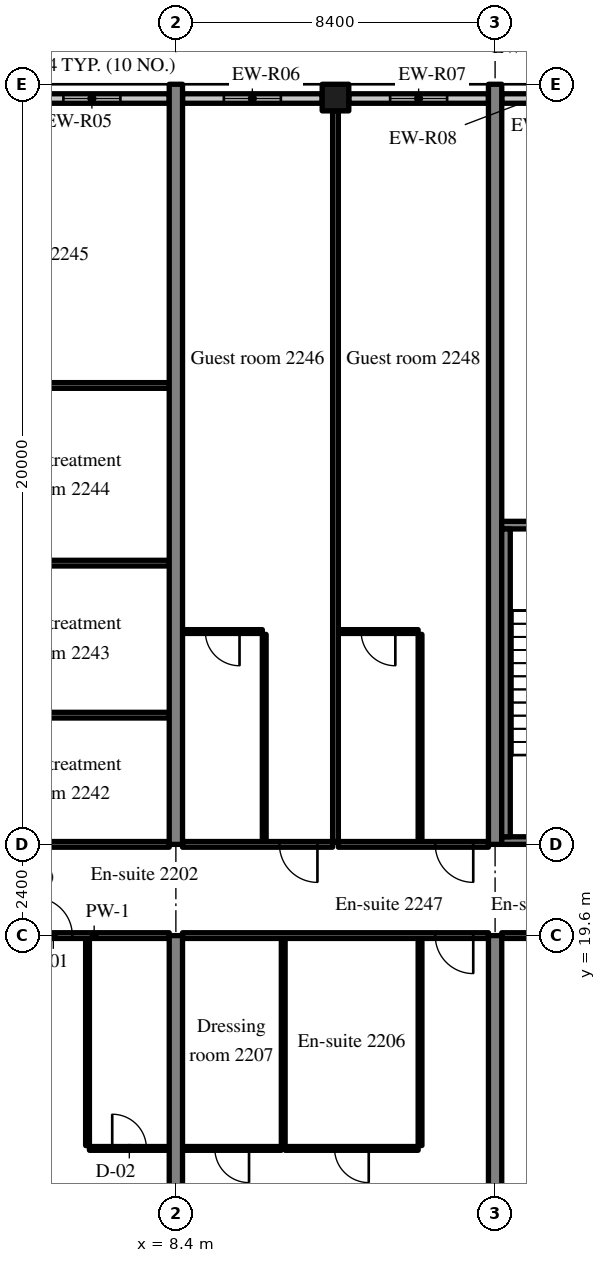
"""IFC4 building model, lengths in metres.
Left out: names, types, materials, properties, quantities, classifications, styles, units other than length and angle.
Written with IfcOpenShell. Run it as: python <this file> out.ifc"""

import sys

from ifc_helpers import new_model, si_unit, direction, frame, frame_2d, origin, origin_2d, place, context, subcontext, project, spatial, rectangle, extrude, source, transform, mapped, element, fill, save


model = new_model("IFC4")
c1 = context("Model", 3, precision=1e-05, world=origin(), true_north=direction((0.0, 1.0)))
c2 = subcontext(c1, "Body", "Model", "MODEL_VIEW")
j1 = project(units=[si_unit("LENGTHUNIT", "METRE"), si_unit("PLANEANGLEUNIT", "RADIAN")], contexts=[c1])
p1 = place(None, origin())
s1 = spatial("IfcSite", under=j1, at=p1, CompositionType="ELEMENT")
p2 = place(p1, origin())
s2 = spatial("IfcBuilding", under=s1, at=p2, CompositionType="ELEMENT")
p3 = place(p2, frame((0.0, 0.0, 95.2)))
s3 = spatial("IfcBuildingStorey", under=s2, at=p3, CompositionType="ELEMENT", Elevation=95.2)
m1 = source(origin(), c2, "Body", "SweptSolid", [
    extrude(rectangle(XDim=14.1, YDim=0.35, at=frame_2d((7.05, 0.0))), origin(), (0.0, 0.0, 1.0), 3.52),
])
p4 = place(p3, frame((8.4, 5.5, 0.0), z_axis=(0.0, 0.0, 1.0), x_axis=(0.0, 1.0, 0.0)))
e1 = element("IfcWall", 1, at=p4, inside=s3, PredefinedType="SHEAR", context=c2, shape_type="MappedRepresentation", body=[
    mapped(m1, transform((0.0, 0.0, 0.0), scale=1.0)),
])
m2 = source(origin(), c2, "Body", "SweptSolid", [
    extrude(rectangle(XDim=20.0, YDim=0.35, at=frame_2d((10.0, 0.0))), origin(), (0.0, 0.0, 1.0), 3.52),
])
p5 = place(p3, frame((8.4, 22.0, 0.0), z_axis=(0.0, 0.0, 1.0), x_axis=(0.0, 1.0, 0.0)))
e2 = element("IfcWall", 2, at=p5, inside=s3, PredefinedType="SHEAR", context=c2, shape_type="MappedRepresentation", body=[
    mapped(m2, transform((0.0, 0.0, 0.0), scale=1.0)),
])
p6 = place(p3, frame((16.8, 5.5, 0.0), z_axis=(0.0, 0.0, 1.0), x_axis=(0.0, 1.0, 0.0)))
e3 = element("IfcWall", 3, at=p6, inside=s3, PredefinedType="SHEAR", context=c2, shape_type="MappedRepresentation", body=[
    mapped(m1, transform((0.0, 0.0, 0.0), scale=1.0)),
])
p7 = place(p3, frame((16.8, 22.0, 0.0), z_axis=(0.0, 0.0, 1.0), x_axis=(0.0, 1.0, 0.0)))
e4 = element("IfcWall", 4, at=p7, inside=s3, PredefinedType="SHEAR", context=c2, shape_type="MappedRepresentation", body=[
    mapped(m2, transform((0.0, 0.0, 0.0), scale=1.0)),
])
m3 = source(origin(), c2, "Body", "SweptSolid", [
    extrude(rectangle(XDim=0.7, YDim=0.7, at=origin_2d()), origin(), (0.0, 0.0, 1.0), 3.52),
])
p8 = place(p3, frame((12.6, 41.65, 0.0), z_axis=(0.0, 0.0, 1.0), x_axis=(1.0, 0.0, 0.0)))
e5 = element("IfcColumn", 5, at=p8, inside=s3, PredefinedType="COLUMN", context=c2, shape_type="MappedRepresentation", body=[
    mapped(m3, transform((0.0, 0.0, 0.0), scale=1.0)),
])
m4 = source(origin(), c2, "Body", "SweptSolid", [
    extrude(rectangle(XDim=4.07, YDim=0.25, at=frame_2d((2.035, 0.0))), origin(), (0.0, 0.0, 1.0), 2.82),
])
p9 = place(p3, frame((8.225, 41.625, 0.0), z_axis=(0.0, 0.0, 1.0), x_axis=(-1.0, 0.0, 0.0)))
e6 = element("IfcWall", 6, at=p9, inside=s3, PredefinedType="SOLIDWALL", context=c2, shape_type="MappedRepresentation", body=[
    mapped(m4, transform((0.0, 0.0, 0.0), scale=1.0)),
])
m5 = source(origin(), c2, "Body", "SweptSolid", [
    extrude(rectangle(XDim=1.5, YDim=1.5, at=frame_2d((0.75, 0.75))), frame((0.0, 0.135, 0.0), z_axis=(0.0, -1.0, 0.0), x_axis=(1.0, 0.0, 0.0)), (0.0, 0.0, 1.0), 0.27),
])
p10 = place(p9, frame((1.285, 0.0, 0.9)))
e7 = element("IfcOpeningElement", 7, at=p10, cuts=e6, PredefinedType="OPENING", context=c2, shape_type="MappedRepresentation", body=[
    mapped(m5, transform((0.0, 0.0, 0.0), scale=1.0)),
])
m6 = source(origin(), c2, "Body", "SweptSolid", [
    extrude(rectangle(XDim=3.675, YDim=0.25, at=frame_2d((1.837, 0.0))), origin(), (0.0, 0.0, 1.0), 2.82),
])
p11 = place(p3, frame((12.25, 41.625, 0.0), z_axis=(0.0, 0.0, 1.0), x_axis=(-1.0, 0.0, 0.0)))
e8 = element("IfcWall", 8, at=p11, inside=s3, PredefinedType="SOLIDWALL", context=c2, shape_type="MappedRepresentation", body=[
    mapped(m6, transform((0.0, 0.0, 0.0), scale=1.0)),
])
p12 = place(p11, frame((1.087, 0.0, 0.9)))
e9 = element("IfcOpeningElement", 9, at=p12, cuts=e8, PredefinedType="OPENING", context=c2, shape_type="MappedRepresentation", body=[
    mapped(m5, transform((0.0, 0.0, 0.0), scale=1.0)),
])
p13 = place(p3, frame((16.625, 41.625, 0.0), z_axis=(0.0, 0.0, 1.0), x_axis=(-1.0, 0.0, 0.0)))
e10 = element("IfcWall", 10, at=p13, inside=s3, PredefinedType="SOLIDWALL", context=c2, shape_type="MappedRepresentation", body=[
    mapped(m6, transform((0.0, 0.0, 0.0), scale=1.0)),
])
p14 = place(p13, frame((1.087, 0.0, 0.9)))
e11 = element("IfcOpeningElement", 11, at=p14, cuts=e10, PredefinedType="OPENING", context=c2, shape_type="MappedRepresentation", body=[
    mapped(m5, transform((0.0, 0.0, 0.0), scale=1.0)),
])
m7 = source(origin(), c2, "Body", "SweptSolid", [
    extrude(rectangle(XDim=1.683, YDim=0.25, at=frame_2d((0.841, 0.0))), origin(), (0.0, 0.0, 1.0), 2.82),
])
p15 = place(p3, frame((18.658, 41.625, 0.0), z_axis=(0.0, 0.0, 1.0), x_axis=(-1.0, 0.0, 0.0)))
e12 = element("IfcWall", 12, at=p15, inside=s3, PredefinedType="SOLIDWALL", context=c2, shape_type="MappedRepresentation", body=[
    mapped(m7, transform((0.0, 0.0, 0.0), scale=1.0)),
])
m8 = source(origin(), c2, "Body", "SweptSolid", [
    extrude(rectangle(XDim=8.225, YDim=0.2, at=frame_2d((4.112, 0.0))), origin(), (0.0, 0.0, 1.0), 3.52),
])
p16 = place(p3, frame((16.975, 22.1, 0.0), z_axis=(0.0, 0.0, 1.0), x_axis=(1.0, 0.0, 0.0)))
e13 = element("IfcWall", 13, at=p16, inside=s3, PredefinedType="SOLIDWALL", context=c2, shape_type="MappedRepresentation", body=[
    mapped(m8, transform((0.0, 0.0, 0.0), scale=1.0)),
])
m9 = source(origin(), c2, "Body", "SweptSolid", [
    extrude(rectangle(XDim=1.2, YDim=2.1, at=frame_2d((0.6, 1.05))), frame((0.0, 0.11, 0.0), z_axis=(0.0, -1.0, 0.0), x_axis=(1.0, 0.0, 0.0)), (0.0, 0.0, 1.0), 0.22),
])
p17 = place(p16, frame((6.025, 0.0, 0.0)))
e14 = element("IfcOpeningElement", 14, at=p17, cuts=e13, PredefinedType="OPENING", context=c2, shape_type="MappedRepresentation", body=[
    mapped(m9, transform((0.0, 0.0, 0.0), scale=1.0)),
])
p18 = place(p3, frame((16.975, 30.4, 0.0), z_axis=(0.0, 0.0, 1.0), x_axis=(1.0, 0.0, 0.0)))
e15 = element("IfcWall", 15, at=p18, inside=s3, PredefinedType="SOLIDWALL", context=c2, shape_type="MappedRepresentation", body=[
    mapped(m8, transform((0.0, 0.0, 0.0), scale=1.0)),
])
m10 = source(origin(), c2, "Body", "SweptSolid", [
    extrude(rectangle(XDim=1.0, YDim=2.1, at=frame_2d((0.5, 1.05))), frame((0.0, 0.11, 0.0), z_axis=(0.0, -1.0, 0.0), x_axis=(1.0, 0.0, 0.0)), (0.0, 0.0, 1.0), 0.22),
])
p19 = place(p18, frame((6.125, 0.0, 0.0)))
e16 = element("IfcOpeningElement", 16, at=p19, cuts=e15, PredefinedType="OPENING", context=c2, shape_type="MappedRepresentation", body=[
    mapped(m10, transform((0.0, 0.0, 0.0), scale=1.0)),
])
m11 = source(origin(), c2, "Body", "SweptSolid", [
    extrude(rectangle(XDim=8.1, YDim=0.225, at=frame_2d((4.05, 0.0))), origin(), (0.0, 0.0, 1.0), 3.52),
])
p20 = place(p3, frame((17.087, 22.2, 0.0), z_axis=(0.0, 0.0, 1.0), x_axis=(0.0, 1.0, 0.0)))
e17 = element("IfcWall", 17, at=p20, inside=s3, PredefinedType="SOLIDWALL", context=c2, shape_type="MappedRepresentation", body=[
    mapped(m11, transform((0.0, 0.0, 0.0), scale=1.0)),
])
m12 = source(origin(), c2, "Body", "SweptSolid", [
    extrude(rectangle(XDim=5.45, YDim=0.1, at=frame_2d((2.725, 0.0))), origin(), (0.0, 0.0, 1.0), 3.52),
])
p21 = place(p3, frame((6.075, 14.075, 0.0), z_axis=(0.0, 0.0, 1.0), x_axis=(0.0, 1.0, 0.0)))
e18 = element("IfcWall", 18, at=p21, inside=s3, PredefinedType="PARTITIONING", context=c2, shape_type="MappedRepresentation", body=[
    mapped(m12, transform((0.0, 0.0, 0.0), scale=1.0)),
])
m13 = source(origin(), c2, "Body", "SweptSolid", [
    extrude(rectangle(XDim=2.1, YDim=0.1, at=frame_2d((1.05, 0.0))), origin(), (0.0, 0.0, 1.0), 3.52),
])
p22 = place(p3, frame((6.125, 14.0, 0.0), z_axis=(0.0, 0.0, 1.0), x_axis=(1.0, 0.0, 0.0)))
e19 = element("IfcWall", 19, at=p22, inside=s3, PredefinedType="PARTITIONING", context=c2, shape_type="MappedRepresentation", body=[
    mapped(m13, transform((0.0, 0.0, 0.0), scale=1.0)),
])
m14 = source(origin(), c2, "Body", "SweptSolid", [
    extrude(rectangle(XDim=0.9, YDim=2.1, at=frame_2d((0.45, 1.05))), frame((0.0, 0.06, 0.0), z_axis=(0.0, -1.0, 0.0), x_axis=(1.0, 0.0, 0.0)), (0.0, 0.0, 1.0), 0.12),
])
p23 = place(p22, frame((0.6, 0.0, 0.0)))
e20 = element("IfcOpeningElement", 20, at=p23, cuts=e19, PredefinedType="OPENING", context=c2, shape_type="MappedRepresentation", body=[
    mapped(m14, transform((0.0, 0.0, 0.0), scale=1.0)),
])
m15 = source(origin(), c2, "Body", "SweptSolid", [
    extrude(rectangle(XDim=3.95, YDim=0.15, at=frame_2d((1.975, 0.0))), origin(), (0.0, 0.0, 1.0), 2.82),
])
p24 = place(p3, frame((4.275, 19.6, 0.0), z_axis=(0.0, 0.0, 1.0), x_axis=(1.0, 0.0, 0.0)))
e21 = element("IfcWall", 21, at=p24, inside=s3, PredefinedType="PARTITIONING", context=c2, shape_type="MappedRepresentation", body=[
    mapped(m15, transform((0.0, 0.0, 0.0), scale=1.0)),
])
m16 = source(origin(), c2, "Body", "SweptSolid", [
    extrude(rectangle(XDim=1.0, YDim=2.1, at=frame_2d((0.5, 1.05))), frame((0.0, 0.085, 0.0), z_axis=(0.0, -1.0, 0.0), x_axis=(1.0, 0.0, 0.0)), (0.0, 0.0, 1.0), 0.17),
])
p25 = place(p24, frame((0.4, 0.0, 0.0)))
e22 = element("IfcOpeningElement", 22, at=p25, cuts=e21, PredefinedType="OPENING", context=c2, shape_type="MappedRepresentation", body=[
    mapped(m16, transform((0.0, 0.0, 0.0), scale=1.0)),
])
for number, where, z_axis, x_axis in (
    (23, (14.825, 14.075, 0.0), (0.0, 0.0, 1.0), (0.0, 1.0, 0.0)),
    (24, (11.225, 14.075, 0.0), (0.0, 0.0, 1.0), (0.0, 1.0, 0.0)),
):
    element("IfcWall", number, at=place(p3, frame(where, z_axis=z_axis, x_axis=x_axis)), inside=s3, PredefinedType="PARTITIONING", context=c2, shape_type="MappedRepresentation", body=[
        mapped(m12, transform((0.0, 0.0, 0.0), scale=1.0)),
    ])
m17 = source(origin(), c2, "Body", "SweptSolid", [
    extrude(rectangle(XDim=3.5, YDim=0.1, at=frame_2d((1.75, 0.0))), origin(), (0.0, 0.0, 1.0), 3.52),
])
p26 = place(p3, frame((11.275, 14.0, 0.0), z_axis=(0.0, 0.0, 1.0), x_axis=(1.0, 0.0, 0.0)))
e25 = element("IfcWall", 25, at=p26, inside=s3, PredefinedType="PARTITIONING", context=c2, shape_type="MappedRepresentation", body=[
    mapped(m17, transform((0.0, 0.0, 0.0), scale=1.0)),
])
p27 = place(p26, frame((1.3, 0.0, 0.0)))
e26 = element("IfcOpeningElement", 26, at=p27, cuts=e25, PredefinedType="OPENING", context=c2, shape_type="MappedRepresentation", body=[
    mapped(m14, transform((0.0, 0.0, 0.0), scale=1.0)),
])
m18 = source(origin(), c2, "Body", "SweptSolid", [
    extrude(rectangle(XDim=2.6, YDim=0.1, at=frame_2d((1.3, 0.0))), origin(), (0.0, 0.0, 1.0), 3.52),
])
p28 = place(p3, frame((8.575, 14.0, 0.0), z_axis=(0.0, 0.0, 1.0), x_axis=(1.0, 0.0, 0.0)))
e27 = element("IfcWall", 27, at=p28, inside=s3, PredefinedType="PARTITIONING", context=c2, shape_type="MappedRepresentation", body=[
    mapped(m18, transform((0.0, 0.0, 0.0), scale=1.0)),
])
p29 = place(p28, frame((0.85, 0.0, 0.0)))
e28 = element("IfcOpeningElement", 28, at=p29, cuts=e27, PredefinedType="OPENING", context=c2, shape_type="MappedRepresentation", body=[
    mapped(m14, transform((0.0, 0.0, 0.0), scale=1.0)),
])
m19 = source(origin(), c2, "Body", "SweptSolid", [
    extrude(rectangle(XDim=8.05, YDim=0.15, at=frame_2d((4.025, 0.0))), origin(), (0.0, 0.0, 1.0), 2.82),
])
p30 = place(p3, frame((8.575, 19.6, 0.0), z_axis=(0.0, 0.0, 1.0), x_axis=(1.0, 0.0, 0.0)))
e29 = element("IfcWall", 29, at=p30, inside=s3, PredefinedType="PARTITIONING", context=c2, shape_type="MappedRepresentation", body=[
    mapped(m19, transform((0.0, 0.0, 0.0), scale=1.0)),
])
p31 = place(p30, frame((6.65, 0.0, 0.0)))
e30 = element("IfcOpeningElement", 30, at=p31, cuts=e29, PredefinedType="OPENING", context=c2, shape_type="MappedRepresentation", body=[
    mapped(m16, transform((0.0, 0.0, 0.0), scale=1.0)),
])
m20 = source(origin(), c2, "Body", "SweptSolid", [
    extrude(rectangle(XDim=8.05, YDim=0.15, at=frame_2d((4.025, 0.0))), origin(), (0.0, 0.0, 1.0), 2.82),
])
p32 = place(p3, frame((16.975, 19.6, 0.0), z_axis=(0.0, 0.0, 1.0), x_axis=(1.0, 0.0, 0.0)))
e31 = element("IfcWall", 31, at=p32, inside=s3, PredefinedType="PARTITIONING", context=c2, shape_type="MappedRepresentation", body=[
    mapped(m20, transform((0.0, 0.0, 0.0), scale=1.0)),
])
m21 = source(origin(), c2, "Body", "SweptSolid", [
    extrude(rectangle(XDim=1.8, YDim=2.1, at=frame_2d((0.9, 1.05))), frame((0.0, 0.085, 0.0), z_axis=(0.0, -1.0, 0.0), x_axis=(1.0, 0.0, 0.0)), (0.0, 0.0, 1.0), 0.17),
])
p33 = place(p32, frame((3.125, 0.0, 0.0)))
e32 = element("IfcOpeningElement", 32, at=p33, cuts=e31, PredefinedType="OPENING", context=c2, shape_type="MappedRepresentation", body=[
    mapped(m21, transform((0.0, 0.0, 0.0), scale=1.0)),
])
m22 = source(origin(), c2, "Body", "SweptSolid", [
    extrude(rectangle(XDim=5.325, YDim=0.15, at=frame_2d((2.663, 0.0))), origin(), (0.0, 0.0, 1.0), 2.82),
])
p34 = place(p3, frame((2.9, 22.0, 0.0), z_axis=(0.0, 0.0, 1.0), x_axis=(1.0, 0.0, 0.0)))
e33 = element("IfcWall", 33, at=p34, inside=s3, PredefinedType="PARTITIONING", context=c2, shape_type="MappedRepresentation", body=[
    mapped(m22, transform((0.0, 0.0, 0.0), scale=1.0)),
])
m23 = source(origin(), c2, "Body", "SweptSolid", [
    extrude(rectangle(XDim=5.325, YDim=0.15, at=frame_2d((2.663, 0.0))), origin(), (0.0, 0.0, 1.0), 3.52),
])
for number, where, z_axis, x_axis in (
    (34, (2.9, 25.4, 0.0), (0.0, 0.0, 1.0), (1.0, 0.0, 0.0)),
    (35, (2.9, 29.4, 0.0), (0.0, 0.0, 1.0), (1.0, 0.0, 0.0)),
):
    element("IfcWall", number, at=place(p3, frame(where, z_axis=z_axis, x_axis=x_axis)), inside=s3, PredefinedType="PARTITIONING", context=c2, shape_type="MappedRepresentation", body=[
        mapped(m23, transform((0.0, 0.0, 0.0), scale=1.0)),
    ])
m24 = source(origin(), c2, "Body", "SweptSolid", [
    extrude(rectangle(XDim=7.875, YDim=0.15, at=frame_2d((3.938, 0.0))), origin(), (0.0, 0.0, 1.0), 3.52),
])
p35 = place(p3, frame((0.35, 34.075, 0.0), z_axis=(0.0, 0.0, 1.0), x_axis=(1.0, 0.0, 0.0)))
e36 = element("IfcWall", 36, at=p35, inside=s3, PredefinedType="PARTITIONING", context=c2, shape_type="MappedRepresentation", body=[
    mapped(m24, transform((0.0, 0.0, 0.0), scale=1.0)),
])
p36 = place(p35, frame((0.7, 0.0, 0.0)))
e37 = element("IfcOpeningElement", 37, at=p36, cuts=e36, PredefinedType="OPENING", context=c2, shape_type="MappedRepresentation", body=[
    mapped(m16, transform((0.0, 0.0, 0.0), scale=1.0)),
])
p37 = place(p3, frame((10.725, 22.075, 0.0), z_axis=(0.0, 0.0, 1.0), x_axis=(0.0, 1.0, 0.0)))
e38 = element("IfcWall", 38, at=p37, inside=s3, PredefinedType="PARTITIONING", context=c2, shape_type="MappedRepresentation", body=[
    mapped(m12, transform((0.0, 0.0, 0.0), scale=1.0)),
])
p38 = place(p3, frame((8.575, 27.6, 0.0), z_axis=(0.0, 0.0, 1.0), x_axis=(1.0, 0.0, 0.0)))
e39 = element("IfcWall", 39, at=p38, inside=s3, PredefinedType="PARTITIONING", context=c2, shape_type="MappedRepresentation", body=[
    mapped(m13, transform((0.0, 0.0, 0.0), scale=1.0)),
])
p39 = place(p38, frame((0.6, 0.0, 0.0)))
e40 = element("IfcOpeningElement", 40, at=p39, cuts=e39, PredefinedType="OPENING", context=c2, shape_type="MappedRepresentation", body=[
    mapped(m14, transform((0.0, 0.0, 0.0), scale=1.0)),
])
m25 = source(origin(), c2, "Body", "SweptSolid", [
    extrude(rectangle(XDim=3.95, YDim=0.15, at=frame_2d((1.975, 0.0))), origin(), (0.0, 0.0, 1.0), 2.82),
])
p40 = place(p3, frame((8.575, 22.0, 0.0), z_axis=(0.0, 0.0, 1.0), x_axis=(1.0, 0.0, 0.0)))
e41 = element("IfcWall", 41, at=p40, inside=s3, PredefinedType="PARTITIONING", context=c2, shape_type="MappedRepresentation", body=[
    mapped(m25, transform((0.0, 0.0, 0.0), scale=1.0)),
])
p41 = place(p40, frame((2.55, 0.0, 0.0)))
e42 = element("IfcOpeningElement", 42, at=p41, cuts=e41, PredefinedType="OPENING", context=c2, shape_type="MappedRepresentation", body=[
    mapped(m16, transform((0.0, 0.0, 0.0), scale=1.0)),
])
p42 = place(p3, frame((14.825, 22.075, 0.0), z_axis=(0.0, 0.0, 1.0), x_axis=(0.0, 1.0, 0.0)))
e43 = element("IfcWall", 43, at=p42, inside=s3, PredefinedType="PARTITIONING", context=c2, shape_type="MappedRepresentation", body=[
    mapped(m12, transform((0.0, 0.0, 0.0), scale=1.0)),
])
m26 = source(origin(), c2, "Body", "SweptSolid", [
    extrude(rectangle(XDim=2.1, YDim=0.1, at=frame_2d((1.05, 0.0))), origin(), (0.0, 0.0, 1.0), 3.52),
])
p43 = place(p3, frame((12.675, 27.6, 0.0), z_axis=(0.0, 0.0, 1.0), x_axis=(1.0, 0.0, 0.0)))
e44 = element("IfcWall", 44, at=p43, inside=s3, PredefinedType="PARTITIONING", context=c2, shape_type="MappedRepresentation", body=[
    mapped(m26, transform((0.0, 0.0, 0.0), scale=1.0)),
])
p44 = place(p43, frame((0.6, 0.0, 0.0)))
e45 = element("IfcOpeningElement", 45, at=p44, cuts=e44, PredefinedType="OPENING", context=c2, shape_type="MappedRepresentation", body=[
    mapped(m14, transform((0.0, 0.0, 0.0), scale=1.0)),
])
p45 = place(p3, frame((12.675, 22.0, 0.0), z_axis=(0.0, 0.0, 1.0), x_axis=(1.0, 0.0, 0.0)))
e46 = element("IfcWall", 46, at=p45, inside=s3, PredefinedType="PARTITIONING", context=c2, shape_type="MappedRepresentation", body=[
    mapped(m25, transform((0.0, 0.0, 0.0), scale=1.0)),
])
p46 = place(p45, frame((2.55, 0.0, 0.0)))
e47 = element("IfcOpeningElement", 47, at=p46, cuts=e46, PredefinedType="OPENING", context=c2, shape_type="MappedRepresentation", body=[
    mapped(m16, transform((0.0, 0.0, 0.0), scale=1.0)),
])
m27 = source(origin(), c2, "Body", "SweptSolid", [
    extrude(rectangle(XDim=19.225, YDim=0.15, at=frame_2d((9.613, 0.0))), origin(), (0.0, 0.0, 1.0), 3.52),
])
p47 = place(p3, frame((12.6, 22.075, 0.0), z_axis=(0.0, 0.0, 1.0), x_axis=(0.0, 1.0, 0.0)))
e48 = element("IfcWall", 48, at=p47, inside=s3, PredefinedType="PARTITIONING", context=c2, shape_type="MappedRepresentation", body=[
    mapped(m27, transform((0.0, 0.0, 0.0), scale=1.0)),
])
m28 = source(origin(), c2, "Body", "SweptSolid", [
    extrude(rectangle(XDim=1.5, YDim=1.5, at=frame_2d((0.75, 0.75))), frame((0.0, 0.03, 0.0), z_axis=(0.0, -1.0, 0.0), x_axis=(1.0, 0.0, 0.0)), (0.0, 0.0, 1.0), 0.06),
])
p48 = place(p10, origin())
e49 = element("IfcWindow", 49, at=p48, inside=s3, PartitioningType="SINGLE_PANEL", PredefinedType="WINDOW", context=c2, shape_type="MappedRepresentation", body=[
    mapped(m28, transform((0.0, 0.0, 0.0), scale=1.0)),
])
fill(e7, e49)
p49 = place(p12, origin())
e50 = element("IfcWindow", 50, at=p49, inside=s3, PartitioningType="SINGLE_PANEL", PredefinedType="WINDOW", context=c2, shape_type="MappedRepresentation", body=[
    mapped(m28, transform((0.0, 0.0, 0.0), scale=1.0)),
])
fill(e9, e50)
p50 = place(p14, origin())
e51 = element("IfcWindow", 51, at=p50, inside=s3, PartitioningType="SINGLE_PANEL", PredefinedType="WINDOW", context=c2, shape_type="MappedRepresentation", body=[
    mapped(m28, transform((0.0, 0.0, 0.0), scale=1.0)),
])
fill(e11, e51)
m29 = source(origin(), c2, "Body", "SweptSolid", [
    extrude(rectangle(XDim=0.9, YDim=2.1, at=frame_2d((0.45, 1.05))), frame((0.0, 0.025, 0.0), z_axis=(0.0, -1.0, 0.0), x_axis=(1.0, 0.0, 0.0)), (0.0, 0.0, 1.0), 0.05),
])
p51 = place(p23, origin())
e52 = element("IfcDoor", 52, at=p51, inside=s3, OperationType="SINGLE_SWING_LEFT", PredefinedType="DOOR", context=c2, shape_type="MappedRepresentation", body=[
    mapped(m29, transform((0.0, 0.0, 0.0), scale=1.0)),
])
fill(e20, e52)
m30 = source(origin(), c2, "Body", "SweptSolid", [
    extrude(rectangle(XDim=1.0, YDim=2.1, at=frame_2d((0.5, 1.05))), frame((0.0, 0.025, 0.0), z_axis=(0.0, -1.0, 0.0), x_axis=(1.0, 0.0, 0.0)), (0.0, 0.0, 1.0), 0.05),
])
p52 = place(p25, origin())
e53 = element("IfcDoor", 53, at=p52, inside=s3, OperationType="SINGLE_SWING_LEFT", PredefinedType="DOOR", context=c2, shape_type="MappedRepresentation", body=[
    mapped(m30, transform((0.0, 0.0, 0.0), scale=1.0)),
])
fill(e22, e53)
p53 = place(p27, origin())
e54 = element("IfcDoor", 54, at=p53, inside=s3, OperationType="SINGLE_SWING_RIGHT", PredefinedType="DOOR", context=c2, shape_type="MappedRepresentation", body=[
    mapped(m29, transform((0.0, 0.0, 0.0), scale=1.0)),
])
fill(e26, e54)
p54 = place(p29, origin())
e55 = element("IfcDoor", 55, at=p54, inside=s3, OperationType="SINGLE_SWING_RIGHT", PredefinedType="DOOR", context=c2, shape_type="MappedRepresentation", body=[
    mapped(m29, transform((0.0, 0.0, 0.0), scale=1.0)),
])
fill(e28, e55)
p55 = place(p31, origin())
e56 = element("IfcDoor", 56, at=p55, inside=s3, OperationType="SINGLE_SWING_RIGHT", PredefinedType="DOOR", context=c2, shape_type="MappedRepresentation", body=[
    mapped(m30, transform((0.0, 0.0, 0.0), scale=1.0)),
])
fill(e30, e56)
p56 = place(p39, origin())
e57 = element("IfcDoor", 57, at=p56, inside=s3, OperationType="SINGLE_SWING_RIGHT", PredefinedType="DOOR", context=c2, shape_type="MappedRepresentation", body=[
    mapped(m29, transform((0.0, 0.0, 0.0), scale=1.0)),
])
fill(e40, e57)
p57 = place(p41, origin())
e58 = element("IfcDoor", 58, at=p57, inside=s3, OperationType="SINGLE_SWING_RIGHT", PredefinedType="DOOR", context=c2, shape_type="MappedRepresentation", body=[
    mapped(m30, transform((0.0, 0.0, 0.0), scale=1.0)),
])
fill(e42, e58)
p58 = place(p44, origin())
e59 = element("IfcDoor", 59, at=p58, inside=s3, OperationType="SINGLE_SWING_RIGHT", PredefinedType="DOOR", context=c2, shape_type="MappedRepresentation", body=[
    mapped(m29, transform((0.0, 0.0, 0.0), scale=1.0)),
])
fill(e45, e59)
p59 = place(p46, origin())
e60 = element("IfcDoor", 60, at=p59, inside=s3, OperationType="SINGLE_SWING_RIGHT", PredefinedType="DOOR", context=c2, shape_type="MappedRepresentation", body=[
    mapped(m30, transform((0.0, 0.0, 0.0), scale=1.0)),
])
fill(e47, e60)
save(model, sys.argv[1])
